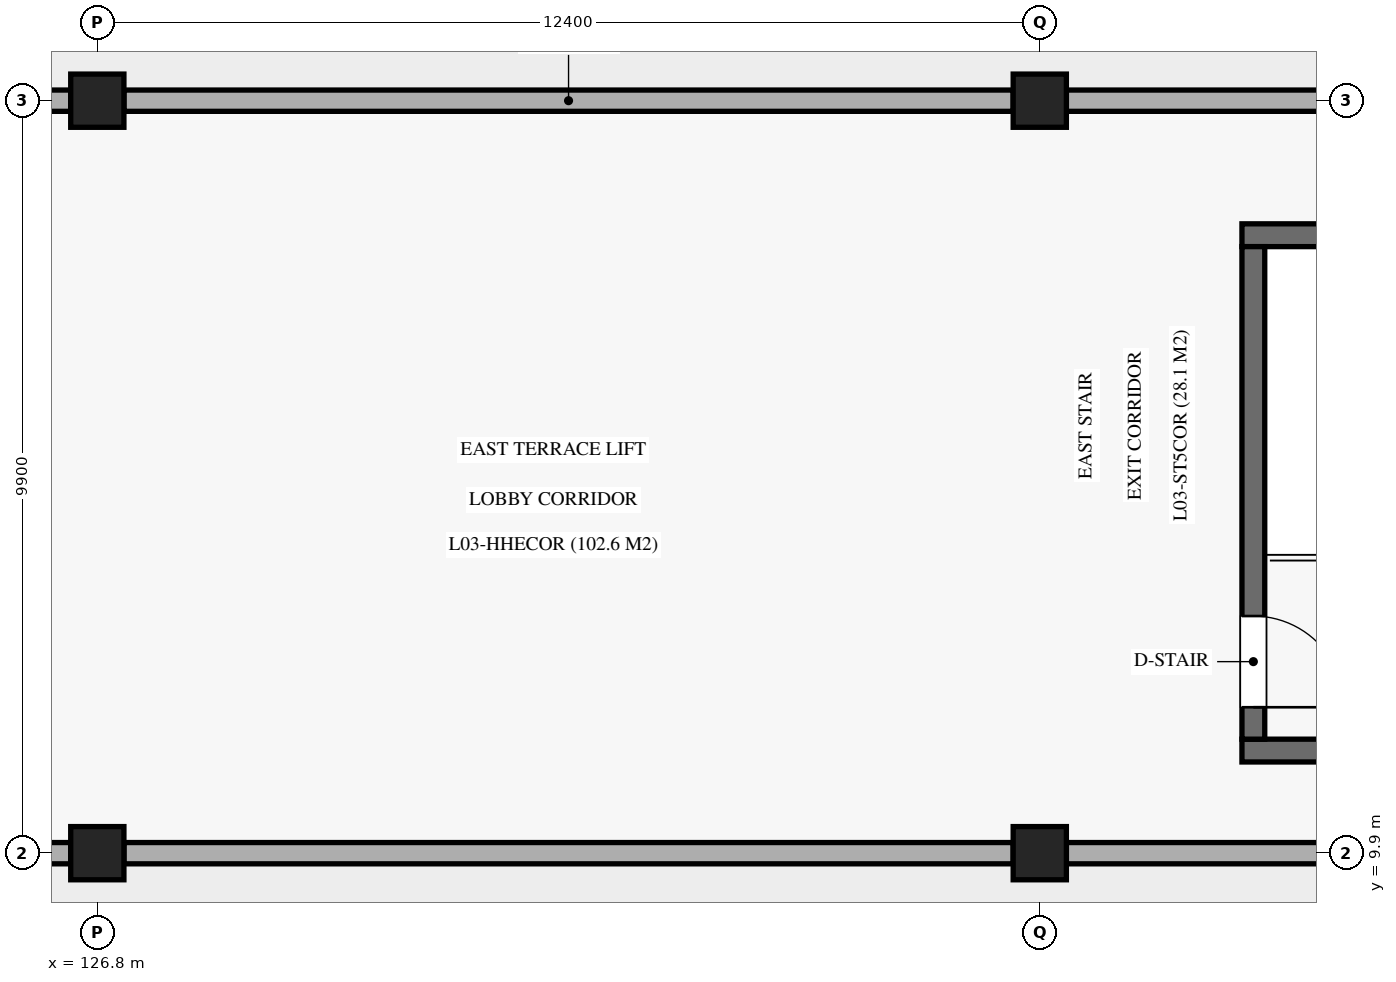
"""IFC4 building model, lengths in metres.
Left out: names, types, materials, properties, quantities, classifications, styles, units other than length and angle.
Written with IfcOpenShell. Run it as: python <this file> out.ifc"""

import sys

from ifc_helpers import new_model, si_unit, direction, frame, frame_2d, origin, origin_2d, place, context, subcontext, project, spatial, rectangle, extrude, element, fill, save


model = new_model("IFC4")
c1 = context("Model", 3, precision=1e-05, world=origin(), true_north=direction((0.0, 1.0)))
c2 = subcontext(c1, "Body", "Model", "MODEL_VIEW")
j1 = project(units=[si_unit("LENGTHUNIT", "METRE"), si_unit("PLANEANGLEUNIT", "RADIAN")], contexts=[c1])
p1 = place(None, origin())
s1 = spatial("IfcSite", under=j1, at=p1, CompositionType="ELEMENT")
p2 = place(p1, origin())
s2 = spatial("IfcBuilding", under=s1, at=p2, CompositionType="ELEMENT")
p3 = place(p2, frame((0.0, 0.0, 16.32)))
s3 = spatial("IfcBuildingStorey", under=s2, at=p3, CompositionType="ELEMENT", Elevation=16.32)
for number, where, z_axis, x_axis in (
    (1, (126.8, 9.9, 0.0), (0.0, 0.0, 1.0), (1.0, 0.0, 0.0)),
    (2, (126.8, 19.8, 0.0), (0.0, 0.0, 1.0), (1.0, 0.0, 0.0)),
    (3, (139.2, 9.9, 0.0), (0.0, 0.0, 1.0), (1.0, 0.0, 0.0)),
    (4, (139.2, 19.8, 0.0), (0.0, 0.0, 1.0), (1.0, 0.0, 0.0)),
):
    element("IfcColumn", number, at=place(p3, frame(where, z_axis=z_axis, x_axis=x_axis)), inside=s3, PredefinedType="COLUMN", context=c2, shape_type="SweptSolid", body=[
        extrude(rectangle(XDim=0.7, YDim=0.7, at=origin_2d()), origin(), (0.0, 0.0, 1.0), 6.12),
    ])
p4 = place(p3, frame((114.8, 19.8, 0.0), z_axis=(0.0, 0.0, 1.0), x_axis=(1.0, 0.0, 0.0)))
e5 = element("IfcWall", 5, at=p4, inside=s3, PredefinedType="SOLIDWALL", context=c2, shape_type="SweptSolid", body=[
    extrude(rectangle(XDim=11.65, YDim=0.28, at=frame_2d((5.825, 0.0))), origin(), (0.0, 0.0, 1.0), 5.08),
])
p5 = place(p4, frame((4.925, 0.0, 0.0)))
e6 = element("IfcOpeningElement", 6, at=p5, cuts=e5, PredefinedType="OPENING", context=c2, shape_type="SweptSolid", body=[
    extrude(rectangle(XDim=1.8, YDim=2.25, at=frame_2d((0.9, 1.125))), frame((0.0, 0.15, 0.0), z_axis=(0.0, -1.0, 0.0), x_axis=(1.0, 0.0, 0.0)), (0.0, 0.0, 1.0), 0.3),
])
p6 = place(p3, frame((114.75, 9.9, 0.0), z_axis=(0.0, 0.0, 1.0), x_axis=(1.0, 0.0, 0.0)))
e7 = element("IfcWall", 7, at=p6, inside=s3, PredefinedType="SOLIDWALL", context=c2, shape_type="SweptSolid", body=[
    extrude(rectangle(XDim=11.7, YDim=0.28, at=frame_2d((5.85, 0.0))), origin(), (0.0, 0.0, 1.0), 5.08),
])
for number, where, z_axis, x_axis in (
    (8, (127.15, 19.8, 0.0), (0.0, 0.0, 1.0), (1.0, 0.0, 0.0)),
    (9, (127.15, 9.9, 0.0), (0.0, 0.0, 1.0), (1.0, 0.0, 0.0)),
):
    element("IfcWall", number, at=place(p3, frame(where, z_axis=z_axis, x_axis=x_axis)), inside=s3, PredefinedType="SOLIDWALL", context=c2, shape_type="SweptSolid", body=[
        extrude(rectangle(XDim=11.7, YDim=0.28, at=frame_2d((5.85, 0.0))), origin(), (0.0, 0.0, 1.0), 5.08),
    ])
for number, where, z_axis, x_axis in (
    (10, (139.55, 19.8, 0.0), (0.0, 0.0, 1.0), (1.0, 0.0, 0.0)),
    (11, (139.55, 9.9, 0.0), (0.0, 0.0, 1.0), (1.0, 0.0, 0.0)),
):
    element("IfcWall", number, at=place(p3, frame(where, z_axis=z_axis, x_axis=x_axis)), inside=s3, PredefinedType="SOLIDWALL", context=c2, shape_type="SweptSolid", body=[
        extrude(rectangle(XDim=11.7, YDim=0.28, at=frame_2d((5.85, 0.0))), origin(), (0.0, 0.0, 1.0), 5.08),
    ])
for number, where, z_axis, x_axis in (
    (12, (141.86, 11.25, 0.0), (0.0, 0.0, 1.0), (1.0, 0.0, 0.0)),
    (13, (141.86, 18.03, 0.0), (0.0, 0.0, 1.0), (1.0, 0.0, 0.0)),
):
    element("IfcWall", number, at=place(p3, frame(where, z_axis=z_axis, x_axis=x_axis)), inside=s3, PredefinedType="SHEAR", context=c2, shape_type="SweptSolid", body=[
        extrude(rectangle(XDim=7.08, YDim=0.3, at=frame_2d((3.54, 0.0))), origin(), (0.0, 0.0, 1.0), 5.86),
    ])
p7 = place(p3, frame((142.01, 11.4, 0.0), z_axis=(0.0, 0.0, 1.0), x_axis=(0.0, 1.0, 0.0)))
e14 = element("IfcWall", 14, at=p7, inside=s3, PredefinedType="SHEAR", context=c2, shape_type="SweptSolid", body=[
    extrude(rectangle(XDim=6.48, YDim=0.3, at=frame_2d((3.24, 0.0))), origin(), (0.0, 0.0, 1.0), 5.86),
])
p8 = place(p7, frame((0.42, 0.0, 0.0)))
e15 = element("IfcOpeningElement", 15, at=p8, cuts=e14, PredefinedType="OPENING", context=c2, shape_type="SweptSolid", body=[
    extrude(rectangle(XDim=1.2, YDim=2.2, at=frame_2d((0.6, 1.1))), frame((0.0, 0.16, 0.0), z_axis=(0.0, -1.0, 0.0), x_axis=(1.0, 0.0, 0.0)), (0.0, 0.0, 1.0), 0.32),
])
p9 = place(p8, frame((1.2, 0.0, 0.0), z_axis=(0.0, 0.0, 1.0), x_axis=(-1.0, 0.0, 0.0)))
e16 = element("IfcDoor", 16, at=p9, inside=s3, OperationType="SINGLE_SWING_RIGHT", PredefinedType="DOOR", context=c2, shape_type="SweptSolid", body=[
    extrude(rectangle(XDim=1.2, YDim=2.2, at=frame_2d((0.6, 1.1))), frame((0.0, 0.025, 0.0), z_axis=(0.0, -1.0, 0.0), x_axis=(1.0, 0.0, 0.0)), (0.0, 0.0, 1.0), 0.05),
])
fill(e15, e16)
save(model, sys.argv[1])
